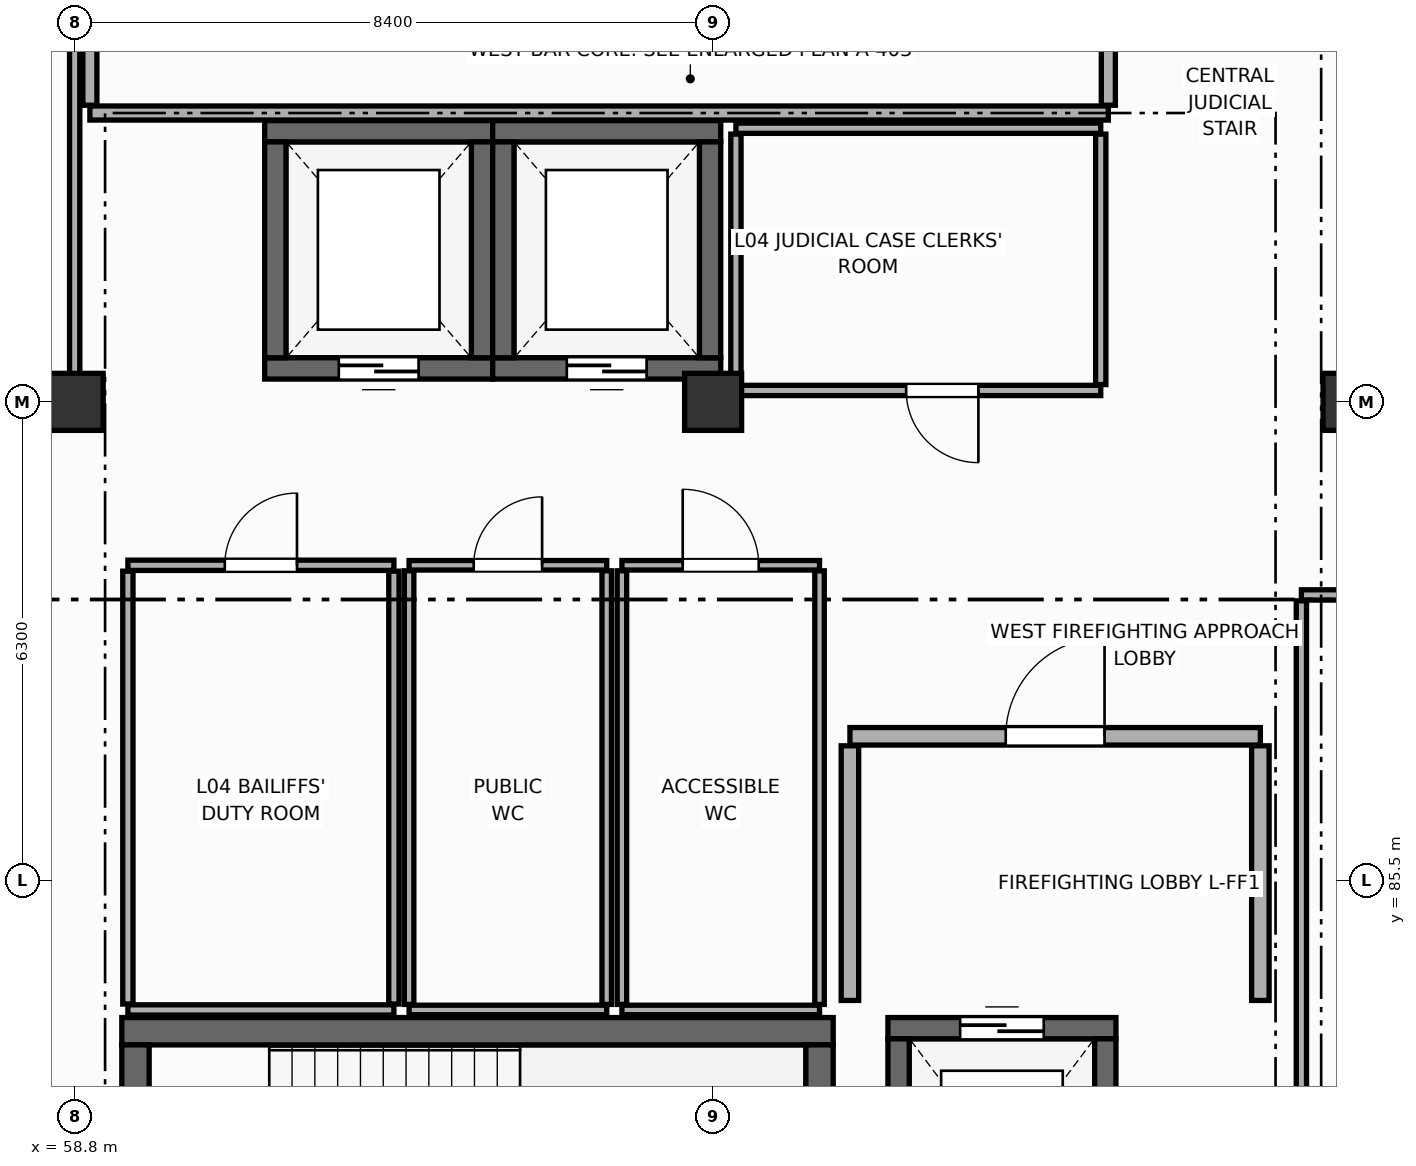
"""IFC4 building model, lengths in metres.
Left out: names, types, materials, properties, quantities, classifications, styles, units other than length and angle.
Written with IfcOpenShell. Run it as: python <this file> out.ifc"""

import sys

from ifc_helpers import new_model, si_unit, direction, frame, frame_2d, origin, origin_2d, place, context, subcontext, project, spatial, rectangle, extrude, element, fill, save


model = new_model("IFC4")
c1 = context("Model", 3, precision=1e-05, world=origin(), true_north=direction((0.0, 1.0)))
c2 = subcontext(c1, "Body", "Model", "MODEL_VIEW")
j1 = project(units=[si_unit("LENGTHUNIT", "METRE"), si_unit("PLANEANGLEUNIT", "RADIAN")], contexts=[c1])
p1 = place(None, origin())
s1 = spatial("IfcSite", under=j1, at=p1, CompositionType="ELEMENT")
p2 = place(p1, origin())
s2 = spatial("IfcBuilding", under=s1, at=p2, CompositionType="ELEMENT")
p3 = place(p2, frame((0.0, 0.0, 14.4)))
s3 = spatial("IfcBuildingStorey", under=s2, at=p3, CompositionType="ELEMENT", Elevation=14.4)
for number, where, z_axis, x_axis in (
    (1, (58.8, 91.8, 0.0), (0.0, 0.0, 1.0), (1.0, 0.0, 0.0)),
    (2, (67.2, 91.8, 0.0), (0.0, 0.0, 1.0), (1.0, 0.0, 0.0)),
    (3, (75.6, 91.8, 0.0), (0.0, 0.0, 1.0), (1.0, 0.0, 0.0)),
):
    element("IfcColumn", number, at=place(p3, frame(where, z_axis=z_axis, x_axis=x_axis)), inside=s3, PredefinedType="COLUMN", context=c2, shape_type="SweptSolid", body=[
        extrude(rectangle(XDim=0.75, YDim=0.75, at=origin_2d()), origin(), (0.0, 0.0, 1.0), 4.2),
    ])
p4 = place(p3, frame((59.42, 83.52, 0.0), z_axis=(0.0, 0.0, 1.0), x_axis=(1.0, 0.0, 0.0)))
e4 = element("IfcWall", 4, at=p4, inside=s3, PredefinedType="SHEAR", context=c2, shape_type="SweptSolid", body=[
    extrude(rectangle(XDim=9.36, YDim=0.36, at=frame_2d((4.68, 0.0))), origin(), (0.0, 0.0, 1.0), 3.96),
])
p5 = place(p3, frame((59.6, 79.98, 0.0), z_axis=(0.0, 0.0, 1.0), x_axis=(0.0, 1.0, 0.0)))
e5 = element("IfcWall", 5, at=p5, inside=s3, PredefinedType="SHEAR", context=c2, shape_type="SweptSolid", body=[
    extrude(rectangle(XDim=3.36, YDim=0.36, at=frame_2d((1.68, 0.0))), origin(), (0.0, 0.0, 1.0), 3.96),
])
p6 = place(p5, frame((1.08, 0.0, 0.0)))
e6 = element("IfcOpeningElement", 6, at=p6, cuts=e5, PredefinedType="OPENING", context=c2, shape_type="SweptSolid", body=[
    extrude(rectangle(XDim=1.2, YDim=2.2, at=frame_2d((0.6, 1.1))), frame((0.0, 0.19, 0.0), z_axis=(0.0, -1.0, 0.0), x_axis=(1.0, 0.0, 0.0)), (0.0, 0.0, 1.0), 0.38),
])
p7 = place(p3, frame((68.6, 83.34, 0.0), z_axis=(0.0, 0.0, 1.0), x_axis=(0.0, -1.0, 0.0)))
e7 = element("IfcWall", 7, at=p7, inside=s3, PredefinedType="SHEAR", context=c2, shape_type="SweptSolid", body=[
    extrude(rectangle(XDim=3.36, YDim=0.36, at=frame_2d((1.68, 0.0))), origin(), (0.0, 0.0, 1.0), 3.96),
])
p8 = place(p3, frame((69.5, 83.56, 0.0), z_axis=(0.0, 0.0, 1.0), x_axis=(1.0, 0.0, 0.0)))
e8 = element("IfcWall", 8, at=p8, inside=s3, PredefinedType="SHEAR", context=c2, shape_type="SweptSolid", body=[
    extrude(rectangle(XDim=3.0, YDim=0.28, at=frame_2d((1.5, 0.0))), origin(), (0.0, 0.0, 1.0), 3.96),
])
p9 = place(p8, frame((0.95, 0.0, 0.0)))
e9 = element("IfcOpeningElement", 9, at=p9, cuts=e8, PredefinedType="OPENING", context=c2, shape_type="SweptSolid", body=[
    extrude(rectangle(XDim=1.1, YDim=2.2, at=frame_2d((0.55, 1.1))), frame((0.0, 0.15, 0.0), z_axis=(0.0, -1.0, 0.0), x_axis=(1.0, 0.0, 0.0)), (0.0, 0.0, 1.0), 0.3),
])
for number, where, z_axis, x_axis in (
    (10, (69.64, 80.18, 0.0), (0.0, 0.0, 1.0), (0.0, 1.0, 0.0)),
    (11, (72.36, 83.42, 0.0), (0.0, 0.0, 1.0), (0.0, -1.0, 0.0)),
):
    element("IfcWall", number, at=place(p3, frame(where, z_axis=z_axis, x_axis=x_axis)), inside=s3, PredefinedType="SHEAR", context=c2, shape_type="SweptSolid", body=[
        extrude(rectangle(XDim=3.24, YDim=0.28, at=frame_2d((1.62, 0.0))), origin(), (0.0, 0.0, 1.0), 3.96),
    ])
p10 = place(p3, frame((61.3, 95.36, 0.0), z_axis=(0.0, 0.0, 1.0), x_axis=(1.0, 0.0, 0.0)))
e12 = element("IfcWall", 12, at=p10, inside=s3, PredefinedType="SHEAR", context=c2, shape_type="SweptSolid", body=[
    extrude(rectangle(XDim=3.0, YDim=0.28, at=frame_2d((1.5, 0.0))), origin(), (0.0, 0.0, 1.0), 3.96),
])
p11 = place(p3, frame((64.3, 92.24, 0.0), z_axis=(0.0, 0.0, 1.0), x_axis=(-1.0, 0.0, 0.0)))
e13 = element("IfcWall", 13, at=p11, inside=s3, PredefinedType="SHEAR", context=c2, shape_type="SweptSolid", body=[
    extrude(rectangle(XDim=3.0, YDim=0.28, at=frame_2d((1.5, 0.0))), origin(), (0.0, 0.0, 1.0), 3.96),
])
p12 = place(p11, frame((0.975, 0.0, 0.0)))
e14 = element("IfcOpeningElement", 14, at=p12, cuts=e13, PredefinedType="OPENING", context=c2, shape_type="SweptSolid", body=[
    extrude(rectangle(XDim=1.05, YDim=2.2, at=frame_2d((0.525, 1.1))), frame((0.0, 0.15, 0.0), z_axis=(0.0, -1.0, 0.0), x_axis=(1.0, 0.0, 0.0)), (0.0, 0.0, 1.0), 0.3),
])
for number, where, z_axis, x_axis in (
    (15, (61.44, 92.38, 0.0), (0.0, 0.0, 1.0), (0.0, 1.0, 0.0)),
    (16, (64.16, 95.22, 0.0), (0.0, 0.0, 1.0), (0.0, -1.0, 0.0)),
):
    element("IfcWall", number, at=place(p3, frame(where, z_axis=z_axis, x_axis=x_axis)), inside=s3, PredefinedType="SHEAR", context=c2, shape_type="SweptSolid", body=[
        extrude(rectangle(XDim=2.84, YDim=0.28, at=frame_2d((1.42, 0.0))), origin(), (0.0, 0.0, 1.0), 3.96),
    ])
p13 = place(p3, frame((64.3, 95.36, 0.0), z_axis=(0.0, 0.0, 1.0), x_axis=(1.0, 0.0, 0.0)))
e17 = element("IfcWall", 17, at=p13, inside=s3, PredefinedType="SHEAR", context=c2, shape_type="SweptSolid", body=[
    extrude(rectangle(XDim=3.0, YDim=0.28, at=frame_2d((1.5, 0.0))), origin(), (0.0, 0.0, 1.0), 3.96),
])
p14 = place(p3, frame((67.3, 92.24, 0.0), z_axis=(0.0, 0.0, 1.0), x_axis=(-1.0, 0.0, 0.0)))
e18 = element("IfcWall", 18, at=p14, inside=s3, PredefinedType="SHEAR", context=c2, shape_type="SweptSolid", body=[
    extrude(rectangle(XDim=3.0, YDim=0.28, at=frame_2d((1.5, 0.0))), origin(), (0.0, 0.0, 1.0), 3.96),
])
p15 = place(p14, frame((0.975, 0.0, 0.0)))
e19 = element("IfcOpeningElement", 19, at=p15, cuts=e18, PredefinedType="OPENING", context=c2, shape_type="SweptSolid", body=[
    extrude(rectangle(XDim=1.05, YDim=2.2, at=frame_2d((0.525, 1.1))), frame((0.0, 0.15, 0.0), z_axis=(0.0, -1.0, 0.0), x_axis=(1.0, 0.0, 0.0)), (0.0, 0.0, 1.0), 0.3),
])
for number, where, z_axis, x_axis in (
    (20, (64.44, 92.38, 0.0), (0.0, 0.0, 1.0), (0.0, 1.0, 0.0)),
    (21, (67.16, 95.22, 0.0), (0.0, 0.0, 1.0), (0.0, -1.0, 0.0)),
):
    element("IfcWall", number, at=place(p3, frame(where, z_axis=z_axis, x_axis=x_axis)), inside=s3, PredefinedType="SHEAR", context=c2, shape_type="SweptSolid", body=[
        extrude(rectangle(XDim=2.84, YDim=0.28, at=frame_2d((1.42, 0.0))), origin(), (0.0, 0.0, 1.0), 3.96),
    ])
p16 = place(p3, frame((69.0, 87.4, 0.0), z_axis=(0.0, 0.0, 1.0), x_axis=(1.0, 0.0, 0.0)))
e22 = element("IfcWall", 22, at=p16, inside=s3, PredefinedType="STANDARD", context=c2, shape_type="SweptSolid", body=[
    extrude(rectangle(XDim=5.4, YDim=0.23, at=frame_2d((2.7, 0.0))), origin(), (0.0, 0.0, 1.0), 3.945),
])
p17 = place(p16, frame((2.05, 0.0, 0.0)))
e23 = element("IfcOpeningElement", 23, at=p17, cuts=e22, PredefinedType="OPENING", context=c2, shape_type="SweptSolid", body=[
    extrude(rectangle(XDim=1.3, YDim=2.2, at=frame_2d((0.65, 1.1))), frame((0.0, 0.125, 0.0), z_axis=(0.0, -1.0, 0.0), x_axis=(1.0, 0.0, 0.0)), (0.0, 0.0, 1.0), 0.25),
])
for number, where, z_axis, x_axis in (
    (24, (69.0, 83.925, 0.0), (0.0, 0.0, 1.0), (0.0, 1.0, 0.0)),
    (25, (74.4, 87.275, 0.0), (0.0, 0.0, 1.0), (0.0, -1.0, 0.0)),
):
    element("IfcWall", number, at=place(p3, frame(where, z_axis=z_axis, x_axis=x_axis)), inside=s3, PredefinedType="STANDARD", context=c2, shape_type="SweptSolid", body=[
        extrude(rectangle(XDim=3.35, YDim=0.23, at=frame_2d((1.675, 0.0))), origin(), (0.0, 0.0, 1.0), 3.945),
    ])
p18 = place(p3, frame((63.2, 89.65, 0.0), z_axis=(0.0, 0.0, 1.0), x_axis=(1.0, 0.0, 0.0)))
e26 = element("IfcWall", 26, at=p18, inside=s3, PredefinedType="PARTITIONING", context=c2, shape_type="SweptSolid", body=[
    extrude(rectangle(XDim=2.6, YDim=0.125, at=frame_2d((1.3, 0.0))), origin(), (0.0, 0.0, 1.0), 3.945),
])
p19 = place(p18, frame((0.85, 0.0, 0.0)))
e27 = element("IfcOpeningElement", 27, at=p19, cuts=e26, PredefinedType="OPENING", context=c2, shape_type="SweptSolid", body=[
    extrude(rectangle(XDim=0.9, YDim=2.1, at=frame_2d((0.45, 1.05))), frame((0.0, 0.073, 0.0), z_axis=(0.0, -1.0, 0.0), x_axis=(1.0, 0.0, 0.0)), (0.0, 0.0, 1.0), 0.145),
])
p20 = place(p3, frame((65.8, 83.8, 0.0), z_axis=(0.0, 0.0, 1.0), x_axis=(-1.0, 0.0, 0.0)))
e28 = element("IfcWall", 28, at=p20, inside=s3, PredefinedType="PARTITIONING", context=c2, shape_type="SweptSolid", body=[
    extrude(rectangle(XDim=2.6, YDim=0.125, at=frame_2d((1.3, 0.0))), origin(), (0.0, 0.0, 1.0), 3.945),
])
for number, where, z_axis, x_axis in (
    (29, (63.2, 83.873, 0.0), (0.0, 0.0, 1.0), (0.0, 1.0, 0.0)),
    (30, (65.8, 89.577, 0.0), (0.0, 0.0, 1.0), (0.0, -1.0, 0.0)),
):
    element("IfcWall", number, at=place(p3, frame(where, z_axis=z_axis, x_axis=x_axis)), inside=s3, PredefinedType="PARTITIONING", context=c2, shape_type="SweptSolid", body=[
        extrude(rectangle(XDim=5.705, YDim=0.125, at=frame_2d((2.853, 0.0))), origin(), (0.0, 0.0, 1.0), 3.945),
    ])
p21 = place(p3, frame((66.0, 89.65, 0.0), z_axis=(0.0, 0.0, 1.0), x_axis=(1.0, 0.0, 0.0)))
e31 = element("IfcWall", 31, at=p21, inside=s3, PredefinedType="PARTITIONING", context=c2, shape_type="SweptSolid", body=[
    extrude(rectangle(XDim=2.6, YDim=0.125, at=frame_2d((1.3, 0.0))), origin(), (0.0, 0.0, 1.0), 3.09),
])
p22 = place(p21, frame((0.8, 0.0, 0.0)))
e32 = element("IfcOpeningElement", 32, at=p22, cuts=e31, PredefinedType="OPENING", context=c2, shape_type="SweptSolid", body=[
    extrude(rectangle(XDim=1.0, YDim=2.1, at=frame_2d((0.5, 1.05))), frame((0.0, 0.073, 0.0), z_axis=(0.0, -1.0, 0.0), x_axis=(1.0, 0.0, 0.0)), (0.0, 0.0, 1.0), 0.145),
])
p23 = place(p3, frame((68.6, 83.8, 0.0), z_axis=(0.0, 0.0, 1.0), x_axis=(-1.0, 0.0, 0.0)))
e33 = element("IfcWall", 33, at=p23, inside=s3, PredefinedType="PARTITIONING", context=c2, shape_type="SweptSolid", body=[
    extrude(rectangle(XDim=2.6, YDim=0.125, at=frame_2d((1.3, 0.0))), origin(), (0.0, 0.0, 1.0), 3.09),
])
for number, where, z_axis, x_axis in (
    (34, (66.0, 83.873, 0.0), (0.0, 0.0, 1.0), (0.0, 1.0, 0.0)),
    (35, (68.6, 89.577, 0.0), (0.0, 0.0, 1.0), (0.0, -1.0, 0.0)),
):
    element("IfcWall", number, at=place(p3, frame(where, z_axis=z_axis, x_axis=x_axis)), inside=s3, PredefinedType="PARTITIONING", context=c2, shape_type="SweptSolid", body=[
        extrude(rectangle(XDim=5.705, YDim=0.125, at=frame_2d((2.853, 0.0))), origin(), (0.0, 0.0, 1.0), 3.945),
    ])
p24 = place(p3, frame((59.5, 89.65, 0.0), z_axis=(0.0, 0.0, 1.0), x_axis=(1.0, 0.0, 0.0)))
e36 = element("IfcWall", 36, at=p24, inside=s3, PredefinedType="PARTITIONING", context=c2, shape_type="SweptSolid", body=[
    extrude(rectangle(XDim=3.5, YDim=0.135, at=frame_2d((1.75, 0.0))), origin(), (0.0, 0.0, 1.0), 3.945),
])
p25 = place(p24, frame((1.275, 0.0, 0.0)))
e37 = element("IfcOpeningElement", 37, at=p25, cuts=e36, PredefinedType="OPENING", context=c2, shape_type="SweptSolid", body=[
    extrude(rectangle(XDim=0.95, YDim=2.15, at=frame_2d((0.475, 1.075))), frame((0.0, 0.077, 0.0), z_axis=(0.0, -1.0, 0.0), x_axis=(1.0, 0.0, 0.0)), (0.0, 0.0, 1.0), 0.155),
])
p26 = place(p3, frame((63.0, 83.8, 0.0), z_axis=(0.0, 0.0, 1.0), x_axis=(-1.0, 0.0, 0.0)))
e38 = element("IfcWall", 38, at=p26, inside=s3, PredefinedType="PARTITIONING", context=c2, shape_type="SweptSolid", body=[
    extrude(rectangle(XDim=3.5, YDim=0.135, at=frame_2d((1.75, 0.0))), origin(), (0.0, 0.0, 1.0), 3.945),
])
for number, where, z_axis, x_axis in (
    (39, (59.5, 83.877, 0.0), (0.0, 0.0, 1.0), (0.0, 1.0, 0.0)),
    (40, (63.0, 89.573, 0.0), (0.0, 0.0, 1.0), (0.0, -1.0, 0.0)),
):
    element("IfcWall", number, at=place(p3, frame(where, z_axis=z_axis, x_axis=x_axis)), inside=s3, PredefinedType="PARTITIONING", context=c2, shape_type="SweptSolid", body=[
        extrude(rectangle(XDim=5.695, YDim=0.135, at=frame_2d((2.848, 0.0))), origin(), (0.0, 0.0, 1.0), 3.945),
    ])
p27 = place(p3, frame((72.4, 95.6, 0.0), z_axis=(0.0, 0.0, 1.0), x_axis=(-1.0, 0.0, 0.0)))
e41 = element("IfcWall", 41, at=p27, inside=s3, PredefinedType="PARTITIONING", context=c2, shape_type="SweptSolid", body=[
    extrude(rectangle(XDim=13.4, YDim=0.185, at=frame_2d((6.7, 0.0))), origin(), (0.0, 0.0, 1.0), 3.09),
])
p28 = place(p3, frame((59.0, 95.702, 0.0), z_axis=(0.0, 0.0, 1.0), x_axis=(0.0, 1.0, 0.0)))
e42 = element("IfcWall", 42, at=p28, inside=s3, PredefinedType="PARTITIONING", context=c2, shape_type="SweptSolid", body=[
    extrude(rectangle(XDim=7.795, YDim=0.185, at=frame_2d((3.897, 0.0))), origin(), (0.0, 0.0, 1.0), 3.09),
])
p29 = place(p3, frame((72.4, 103.981, 0.0), z_axis=(0.0, 0.0, 1.0), x_axis=(0.0, -1.0, 0.0)))
e43 = element("IfcWall", 43, at=p29, inside=s3, PredefinedType="PARTITIONING", context=c2, shape_type="SweptSolid", body=[
    extrude(rectangle(XDim=8.279, YDim=0.185, at=frame_2d((4.139, 0.0))), origin(), (0.0, 0.0, 1.0), 3.34),
])
p30 = place(p29, frame((2.581, 0.0, 0.0)))
e44 = element("IfcOpeningElement", 44, at=p30, cuts=e43, PredefinedType="OPENING", context=c2, shape_type="SweptSolid", body=[
    extrude(rectangle(XDim=2.0, YDim=2.5, at=frame_2d((1.0, 1.25))), frame((0.0, 0.103, 0.0), z_axis=(0.0, -1.0, 0.0), x_axis=(1.0, 0.0, 0.0)), (0.0, 0.0, 1.0), 0.205),
])
p31 = place(p3, frame((67.5, 95.4, 0.0), z_axis=(0.0, 0.0, 1.0), x_axis=(1.0, 0.0, 0.0)))
e45 = element("IfcWall", 45, at=p31, inside=s3, PredefinedType="PARTITIONING", context=c2, shape_type="SweptSolid", body=[
    extrude(rectangle(XDim=4.8, YDim=0.135, at=frame_2d((2.4, 0.0))), origin(), (0.0, 0.0, 1.0), 3.09),
])
p32 = place(p3, frame((72.3, 91.95, 0.0), z_axis=(0.0, 0.0, 1.0), x_axis=(-1.0, 0.0, 0.0)))
e46 = element("IfcWall", 46, at=p32, inside=s3, PredefinedType="PARTITIONING", context=c2, shape_type="SweptSolid", body=[
    extrude(rectangle(XDim=4.8, YDim=0.135, at=frame_2d((2.4, 0.0))), origin(), (0.0, 0.0, 1.0), 3.09),
])
p33 = place(p32, frame((1.61, 0.0, 0.0)))
e47 = element("IfcOpeningElement", 47, at=p33, cuts=e46, PredefinedType="OPENING", context=c2, shape_type="SweptSolid", body=[
    extrude(rectangle(XDim=0.95, YDim=2.15, at=frame_2d((0.475, 1.075))), frame((0.0, 0.077, 0.0), z_axis=(0.0, -1.0, 0.0), x_axis=(1.0, 0.0, 0.0)), (0.0, 0.0, 1.0), 0.155),
])
p34 = place(p3, frame((67.5, 92.028, 0.0), z_axis=(0.0, 0.0, 1.0), x_axis=(0.0, 1.0, 0.0)))
e48 = element("IfcWall", 48, at=p34, inside=s3, PredefinedType="PARTITIONING", context=c2, shape_type="SweptSolid", body=[
    extrude(rectangle(XDim=3.295, YDim=0.135, at=frame_2d((1.647, 0.0))), origin(), (0.0, 0.0, 1.0), 3.09),
])
p35 = place(p3, frame((72.3, 95.323, 0.0), z_axis=(0.0, 0.0, 1.0), x_axis=(0.0, -1.0, 0.0)))
e49 = element("IfcWall", 49, at=p35, inside=s3, PredefinedType="PARTITIONING", context=c2, shape_type="SweptSolid", body=[
    extrude(rectangle(XDim=3.295, YDim=0.135, at=frame_2d((1.647, 0.0))), origin(), (0.0, 0.0, 1.0), 3.39),
])
p36 = place(p3, frame((74.94, 89.26, 0.0), z_axis=(0.0, 0.0, 1.0), x_axis=(1.0, 0.0, 0.0)))
e50 = element("IfcWall", 50, at=p36, inside=s3, PredefinedType="PARTITIONING", context=c2, shape_type="SweptSolid", body=[
    extrude(rectangle(XDim=4.72, YDim=0.135, at=frame_2d((2.36, 0.0))), origin(), (0.0, 0.0, 1.0), 3.09),
])
p37 = place(p36, frame((2.039, 0.0, 0.0)))
e51 = element("IfcOpeningElement", 51, at=p37, cuts=e50, PredefinedType="OPENING", context=c2, shape_type="SweptSolid", body=[
    extrude(rectangle(XDim=0.95, YDim=2.15, at=frame_2d((0.475, 1.075))), frame((0.0, 0.077, 0.0), z_axis=(0.0, -1.0, 0.0), x_axis=(1.0, 0.0, 0.0)), (0.0, 0.0, 1.0), 0.155),
])
p38 = place(p3, frame((74.94, 79.619, 0.0), z_axis=(0.0, 0.0, 1.0), x_axis=(0.0, 1.0, 0.0)))
e52 = element("IfcWall", 52, at=p38, inside=s3, PredefinedType="PARTITIONING", context=c2, shape_type="SweptSolid", body=[
    extrude(rectangle(XDim=9.564, YDim=0.135, at=frame_2d((4.782, 0.0))), origin(), (0.0, 0.0, 1.0), 3.945),
])
p39 = place(p3, frame((58.8, 91.95, 0.0), z_axis=(0.0, 0.0, 1.0), x_axis=(-1.0, 0.0, 0.0)))
e53 = element("IfcWall", 53, at=p39, inside=s3, PredefinedType="PARTITIONING", context=c2, shape_type="SweptSolid", body=[
    extrude(rectangle(XDim=9.5, YDim=0.135, at=frame_2d((4.75, 0.0))), origin(), (0.0, 0.0, 1.0), 2.99),
])
p40 = place(p39, frame((3.073, 0.0, 0.0)))
e54 = element("IfcOpeningElement", 54, at=p40, cuts=e53, PredefinedType="OPENING", context=c2, shape_type="SweptSolid", body=[
    extrude(rectangle(XDim=1.02, YDim=2.15, at=frame_2d((0.51, 1.075))), frame((0.0, 0.077, 0.0), z_axis=(0.0, -1.0, 0.0), x_axis=(1.0, 0.0, 0.0)), (0.0, 0.0, 1.0), 0.155),
])
p41 = place(p3, frame((58.8, 99.423, 0.0), z_axis=(0.0, 0.0, 1.0), x_axis=(0.0, -1.0, 0.0)))
e55 = element("IfcWall", 55, at=p41, inside=s3, PredefinedType="PARTITIONING", context=c2, shape_type="SweptSolid", body=[
    extrude(rectangle(XDim=7.395, YDim=0.135, at=frame_2d((3.698, 0.0))), origin(), (0.0, 0.0, 1.0), 3.09),
])
p42 = place(p9, origin())
e56 = element("IfcDoor", 56, at=p42, inside=s3, OperationType="DOUBLE_DOOR_SLIDING", PredefinedType="DOOR", context=c2, shape_type="SweptSolid", body=[
    extrude(rectangle(XDim=1.1, YDim=2.2, at=frame_2d((0.55, 1.1))), frame((0.0, 0.025, 0.0), z_axis=(0.0, -1.0, 0.0), x_axis=(1.0, 0.0, 0.0)), (0.0, 0.0, 1.0), 0.05),
])
fill(e9, e56)
p43 = place(p12, origin())
e57 = element("IfcDoor", 57, at=p43, inside=s3, OperationType="DOUBLE_DOOR_SLIDING", PredefinedType="DOOR", context=c2, shape_type="SweptSolid", body=[
    extrude(rectangle(XDim=1.05, YDim=2.2, at=frame_2d((0.525, 1.1))), frame((0.0, 0.025, 0.0), z_axis=(0.0, -1.0, 0.0), x_axis=(1.0, 0.0, 0.0)), (0.0, 0.0, 1.0), 0.05),
])
fill(e14, e57)
p44 = place(p15, origin())
e58 = element("IfcDoor", 58, at=p44, inside=s3, OperationType="DOUBLE_DOOR_SLIDING", PredefinedType="DOOR", context=c2, shape_type="SweptSolid", body=[
    extrude(rectangle(XDim=1.05, YDim=2.2, at=frame_2d((0.525, 1.1))), frame((0.0, 0.025, 0.0), z_axis=(0.0, -1.0, 0.0), x_axis=(1.0, 0.0, 0.0)), (0.0, 0.0, 1.0), 0.05),
])
fill(e19, e58)
p45 = place(p17, origin())
e59 = element("IfcDoor", 59, at=p45, inside=s3, OperationType="SINGLE_SWING_RIGHT", PredefinedType="DOOR", context=c2, shape_type="SweptSolid", body=[
    extrude(rectangle(XDim=1.3, YDim=2.2, at=frame_2d((0.65, 1.1))), frame((0.0, 0.025, 0.0), z_axis=(0.0, -1.0, 0.0), x_axis=(1.0, 0.0, 0.0)), (0.0, 0.0, 1.0), 0.05),
])
fill(e23, e59)
p46 = place(p19, origin())
e60 = element("IfcDoor", 60, at=p46, inside=s3, OperationType="SINGLE_SWING_RIGHT", PredefinedType="DOOR", context=c2, shape_type="SweptSolid", body=[
    extrude(rectangle(XDim=0.9, YDim=2.1, at=frame_2d((0.45, 1.05))), frame((0.0, 0.025, 0.0), z_axis=(0.0, -1.0, 0.0), x_axis=(1.0, 0.0, 0.0)), (0.0, 0.0, 1.0), 0.05),
])
fill(e27, e60)
p47 = place(p22, origin())
e61 = element("IfcDoor", 61, at=p47, inside=s3, OperationType="SINGLE_SWING_LEFT", PredefinedType="DOOR", context=c2, shape_type="SweptSolid", body=[
    extrude(rectangle(XDim=1.0, YDim=2.1, at=frame_2d((0.5, 1.05))), frame((0.0, 0.025, 0.0), z_axis=(0.0, -1.0, 0.0), x_axis=(1.0, 0.0, 0.0)), (0.0, 0.0, 1.0), 0.05),
])
fill(e32, e61)
p48 = place(p25, origin())
e62 = element("IfcDoor", 62, at=p48, inside=s3, OperationType="SINGLE_SWING_RIGHT", PredefinedType="DOOR", context=c2, shape_type="SweptSolid", body=[
    extrude(rectangle(XDim=0.95, YDim=2.15, at=frame_2d((0.475, 1.075))), frame((0.0, 0.025, 0.0), z_axis=(0.0, -1.0, 0.0), x_axis=(1.0, 0.0, 0.0)), (0.0, 0.0, 1.0), 0.05),
])
fill(e37, e62)
p49 = place(p33, origin())
e63 = element("IfcDoor", 63, at=p49, inside=s3, OperationType="SINGLE_SWING_LEFT", PredefinedType="DOOR", context=c2, shape_type="SweptSolid", body=[
    extrude(rectangle(XDim=0.95, YDim=2.15, at=frame_2d((0.475, 1.075))), frame((0.0, 0.025, 0.0), z_axis=(0.0, -1.0, 0.0), x_axis=(1.0, 0.0, 0.0)), (0.0, 0.0, 1.0), 0.05),
])
fill(e47, e63)
save(model, sys.argv[1])
